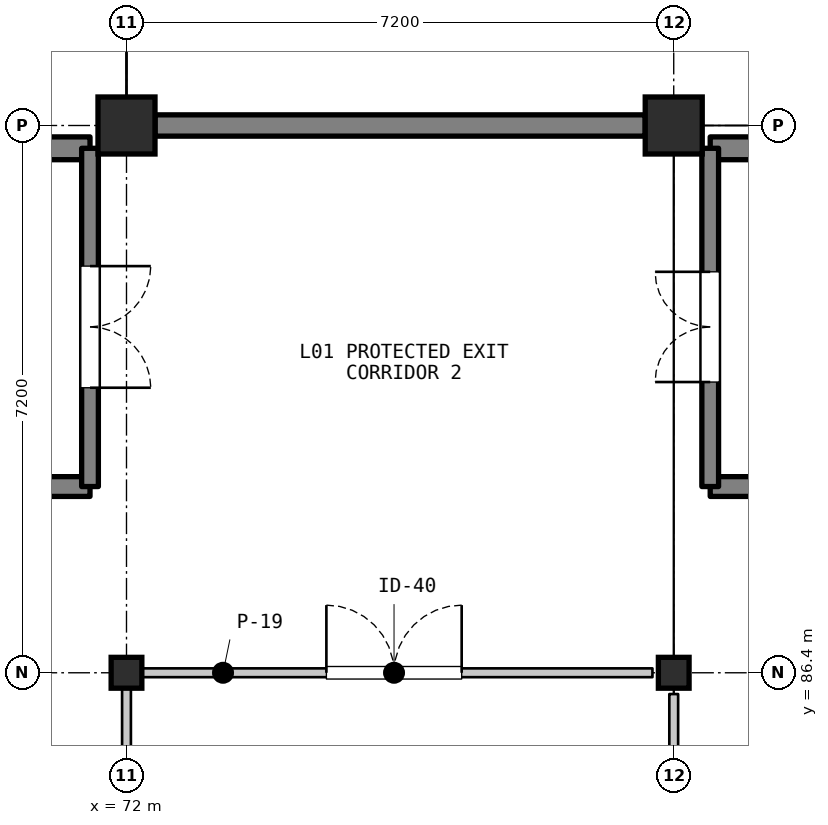
"""IFC4 building model, lengths in metres.
Left out: names, types, materials, properties, quantities, classifications, styles, units other than length and angle.
Written with IfcOpenShell. Run it as: python <this file> out.ifc"""

import sys

from ifc_helpers import new_model, si_unit, direction, frame, frame_2d, origin, origin_2d, place, context, subcontext, project, spatial, rectangle, i_section, extrude, element, fill, save


model = new_model("IFC4")
c1 = context("Model", 3, precision=1e-05, world=origin(), true_north=direction((0.0, 1.0)))
c2 = subcontext(c1, "Body", "Model", "MODEL_VIEW")
j1 = project(units=[si_unit("LENGTHUNIT", "METRE"), si_unit("PLANEANGLEUNIT", "RADIAN")], contexts=[c1])
p1 = place(None, origin())
s1 = spatial("IfcSite", under=j1, at=p1, CompositionType="ELEMENT")
p2 = place(p1, origin())
s2 = spatial("IfcBuilding", under=s1, at=p2, CompositionType="ELEMENT")
p3 = place(p2, origin())
s3 = spatial("IfcBuildingStorey", under=s2, at=p3, CompositionType="ELEMENT", Elevation=0.0)
p4 = place(p3, frame((72.0, 86.4, 0.0), z_axis=(0.0, 0.0, 1.0), x_axis=(1.0, 0.0, 0.0)))
e1 = element("IfcColumn", 1, at=p4, inside=s3, PredefinedType="COLUMN", context=c2, shape_type="SweptSolid", body=[
    extrude(i_section(OverallWidth=0.404, OverallDepth=0.406, WebThickness=0.027, FlangeThickness=0.044, FilletRadius=0.015, at=origin_2d()), origin(), (0.0, 0.0, 1.0), 5.4),
])
p5 = place(p3, frame((72.0, 93.6, 0.0), z_axis=(0.0, 0.0, 1.0), x_axis=(1.0, 0.0, 0.0)))
e2 = element("IfcColumn", 2, at=p5, inside=s3, PredefinedType="COLUMN", context=c2, shape_type="SweptSolid", body=[
    extrude(rectangle(XDim=0.75, YDim=0.75, at=origin_2d()), origin(), (0.0, 0.0, 1.0), 5.4),
])
p6 = place(p3, frame((79.2, 86.4, 0.0), z_axis=(0.0, 0.0, 1.0), x_axis=(1.0, 0.0, 0.0)))
e3 = element("IfcColumn", 3, at=p6, inside=s3, PredefinedType="COLUMN", context=c2, shape_type="SweptSolid", body=[
    extrude(i_section(OverallWidth=0.404, OverallDepth=0.406, WebThickness=0.027, FlangeThickness=0.044, FilletRadius=0.015, at=origin_2d()), origin(), (0.0, 0.0, 1.0), 5.4),
])
p7 = place(p3, frame((79.2, 93.6, 0.0), z_axis=(0.0, 0.0, 1.0), x_axis=(1.0, 0.0, 0.0)))
e4 = element("IfcColumn", 4, at=p7, inside=s3, PredefinedType="COLUMN", context=c2, shape_type="SweptSolid", body=[
    extrude(rectangle(XDim=0.75, YDim=0.75, at=origin_2d()), origin(), (0.0, 0.0, 1.0), 5.4),
])
p8 = place(p3, frame((72.375, 93.6, 0.0), z_axis=(0.0, 0.0, 1.0), x_axis=(1.0, 0.0, 0.0)))
e5 = element("IfcWall", 5, at=p8, inside=s3, PredefinedType="SOLIDWALL", context=c2, shape_type="SweptSolid", body=[
    extrude(rectangle(XDim=6.45, YDim=0.28, at=frame_2d((3.225, 0.0))), origin(), (0.0, 0.0, 1.0), 4.598),
])
p9 = place(p3, frame((66.11, 88.85, 0.0), z_axis=(0.0, 0.0, 1.0), x_axis=(1.0, 0.0, 0.0)))
e6 = element("IfcWall", 6, at=p9, inside=s3, PredefinedType="SHEAR", context=c2, shape_type="SweptSolid", body=[
    extrude(rectangle(XDim=5.41, YDim=0.26, at=frame_2d((2.705, 0.0))), origin(), (0.0, 0.0, 1.0), 5.2),
])
p10 = place(p9, frame((2.84, 0.0, 0.0)))
e7 = element("IfcOpeningElement", 7, at=p10, cuts=e6, PredefinedType="OPENING", context=c2, shape_type="SweptSolid", body=[
    extrude(rectangle(XDim=1.22, YDim=2.15, at=frame_2d((0.61, 1.075))), frame((0.0, 0.14, 0.0), z_axis=(0.0, -1.0, 0.0), x_axis=(1.0, 0.0, 0.0)), (0.0, 0.0, 1.0), 0.28),
])
p11 = place(p3, frame((65.6, 93.3, 0.0), z_axis=(0.0, 0.0, 1.0), x_axis=(1.0, 0.0, 0.0)))
e8 = element("IfcWall", 8, at=p11, inside=s3, PredefinedType="SHEAR", context=c2, shape_type="SweptSolid", body=[
    extrude(rectangle(XDim=5.92, YDim=0.3, at=frame_2d((2.96, 0.0))), origin(), (0.0, 0.0, 1.0), 5.2),
])
p12 = place(p11, frame((3.7, 0.0, 0.0)))
e9 = element("IfcOpeningElement", 9, at=p12, cuts=e8, PredefinedType="OPENING", context=c2, shape_type="SweptSolid", body=[
    extrude(rectangle(XDim=1.22, YDim=2.15, at=frame_2d((0.61, 1.075))), frame((0.0, 0.16, 0.0), z_axis=(0.0, -1.0, 0.0), x_axis=(1.0, 0.0, 0.0)), (0.0, 0.0, 1.0), 0.32),
])
p13 = place(p3, frame((71.52, 93.3, 0.0), z_axis=(0.0, 0.0, 1.0), x_axis=(0.0, -1.0, 0.0)))
e10 = element("IfcWall", 10, at=p13, inside=s3, PredefinedType="SHEAR", context=c2, shape_type="SweptSolid", body=[
    extrude(rectangle(XDim=4.45, YDim=0.22, at=frame_2d((2.225, 0.0))), origin(), (0.0, 0.0, 1.0), 5.2),
])
p14 = place(p13, frame((1.55, 0.0, 0.0)))
e11 = element("IfcOpeningElement", 11, at=p14, cuts=e10, PredefinedType="OPENING", context=c2, shape_type="SweptSolid", body=[
    extrude(rectangle(XDim=1.6, YDim=2.2, at=frame_2d((0.8, 1.1))), frame((0.0, 0.12, 0.0), z_axis=(0.0, -1.0, 0.0), x_axis=(1.0, 0.0, 0.0)), (0.0, 0.0, 1.0), 0.24),
])
p15 = place(p3, frame((79.68, 88.85, 0.0), z_axis=(0.0, 0.0, 1.0), x_axis=(1.0, 0.0, 0.0)))
e12 = element("IfcWall", 12, at=p15, inside=s3, PredefinedType="SHEAR", context=c2, shape_type="SweptSolid", body=[
    extrude(rectangle(XDim=5.41, YDim=0.26, at=frame_2d((2.705, 0.0))), origin(), (0.0, 0.0, 1.0), 5.2),
])
p16 = place(p15, frame((1.37, 0.0, 0.0)))
e13 = element("IfcOpeningElement", 13, at=p16, cuts=e12, PredefinedType="OPENING", context=c2, shape_type="SweptSolid", body=[
    extrude(rectangle(XDim=1.15, YDim=2.15, at=frame_2d((0.575, 1.075))), frame((0.0, 0.14, 0.0), z_axis=(0.0, -1.0, 0.0), x_axis=(1.0, 0.0, 0.0)), (0.0, 0.0, 1.0), 0.28),
])
p17 = place(p3, frame((79.68, 93.3, 0.0), z_axis=(0.0, 0.0, 1.0), x_axis=(1.0, 0.0, 0.0)))
e14 = element("IfcWall", 14, at=p17, inside=s3, PredefinedType="SHEAR", context=c2, shape_type="SweptSolid", body=[
    extrude(rectangle(XDim=5.92, YDim=0.3, at=frame_2d((2.96, 0.0))), origin(), (0.0, 0.0, 1.0), 5.2),
])
p18 = place(p17, frame((1.0, 0.0, 0.0)))
e15 = element("IfcOpeningElement", 15, at=p18, cuts=e14, PredefinedType="OPENING", context=c2, shape_type="SweptSolid", body=[
    extrude(rectangle(XDim=1.15, YDim=2.15, at=frame_2d((0.575, 1.075))), frame((0.0, 0.16, 0.0), z_axis=(0.0, -1.0, 0.0), x_axis=(1.0, 0.0, 0.0)), (0.0, 0.0, 1.0), 0.32),
])
p19 = place(p3, frame((79.68, 88.85, 0.0), z_axis=(0.0, 0.0, 1.0), x_axis=(0.0, 1.0, 0.0)))
e16 = element("IfcWall", 16, at=p19, inside=s3, PredefinedType="SHEAR", context=c2, shape_type="SweptSolid", body=[
    extrude(rectangle(XDim=4.45, YDim=0.22, at=frame_2d((2.225, 0.0))), origin(), (0.0, 0.0, 1.0), 5.2),
])
p20 = place(p19, frame((1.375, 0.0, 0.0)))
e17 = element("IfcOpeningElement", 17, at=p20, cuts=e16, PredefinedType="OPENING", context=c2, shape_type="SweptSolid", body=[
    extrude(rectangle(XDim=1.45, YDim=2.2, at=frame_2d((0.725, 1.1))), frame((0.0, 0.12, 0.0), z_axis=(0.0, -1.0, 0.0), x_axis=(1.0, 0.0, 0.0)), (0.0, 0.0, 1.0), 0.24),
])
p21 = place(p3, frame((72.12, 86.4, 0.0), z_axis=(0.0, 0.0, 1.0), x_axis=(1.0, 0.0, 0.0)))
e18 = element("IfcWall", 18, at=p21, inside=s3, PredefinedType="PARTITIONING", context=c2, shape_type="SweptSolid", body=[
    extrude(rectangle(XDim=6.8, YDim=0.116, at=frame_2d((3.4, 0.0))), origin(), (0.0, 0.0, 1.0), 4.588),
])
p22 = place(p21, frame((2.51, 0.0, 0.0)))
e19 = element("IfcOpeningElement", 19, at=p22, cuts=e18, PredefinedType="OPENING", context=c2, shape_type="SweptSolid", body=[
    extrude(rectangle(XDim=1.78, YDim=2.36, at=frame_2d((0.89, 1.18))), frame((0.0, 0.068, 0.0), z_axis=(0.0, -1.0, 0.0), x_axis=(1.0, 0.0, 0.0)), (0.0, 0.0, 1.0), 0.136),
])
p23 = place(p3, frame((72.0, 79.32, 0.0), z_axis=(0.0, 0.0, 1.0), x_axis=(0.0, 1.0, 0.0)))
e20 = element("IfcWall", 20, at=p23, inside=s3, PredefinedType="PARTITIONING", context=c2, shape_type="SweptSolid", body=[
    extrude(rectangle(XDim=6.96, YDim=0.116, at=frame_2d((3.48, 0.0))), origin(), (0.0, 0.0, 1.0), 4.588),
])
p24 = place(p3, frame((79.2, 86.12, 0.0), z_axis=(0.0, 0.0, 1.0), x_axis=(0.0, -1.0, 0.0)))
e21 = element("IfcWall", 21, at=p24, inside=s3, PredefinedType="PARTITIONING", context=c2, shape_type="SweptSolid", body=[
    extrude(rectangle(XDim=6.64, YDim=0.116, at=frame_2d((3.32, 0.0))), origin(), (0.0, 0.0, 1.0), 4.657),
])
p25 = place(p14, origin())
e22 = element("IfcDoor", 22, at=p25, inside=s3, OperationType="DOUBLE_DOOR_SINGLE_SWING", PredefinedType="DOOR", context=c2, shape_type="SweptSolid", body=[
    extrude(rectangle(XDim=1.6, YDim=2.2, at=frame_2d((0.8, 1.1))), frame((0.0, 0.025, 0.0), z_axis=(0.0, -1.0, 0.0), x_axis=(1.0, 0.0, 0.0)), (0.0, 0.0, 1.0), 0.05),
])
fill(e11, e22)
p26 = place(p20, origin())
e23 = element("IfcDoor", 23, at=p26, inside=s3, OperationType="DOUBLE_DOOR_SINGLE_SWING", PredefinedType="DOOR", context=c2, shape_type="SweptSolid", body=[
    extrude(rectangle(XDim=1.45, YDim=2.2, at=frame_2d((0.725, 1.1))), frame((0.0, 0.025, 0.0), z_axis=(0.0, -1.0, 0.0), x_axis=(1.0, 0.0, 0.0)), (0.0, 0.0, 1.0), 0.05),
])
fill(e17, e23)
p27 = place(p22, origin())
e24 = element("IfcDoor", 24, at=p27, inside=s3, OperationType="DOUBLE_DOOR_SINGLE_SWING", PredefinedType="DOOR", context=c2, shape_type="SweptSolid", body=[
    extrude(rectangle(XDim=1.78, YDim=2.36, at=frame_2d((0.89, 1.18))), frame((0.0, 0.025, 0.0), z_axis=(0.0, -1.0, 0.0), x_axis=(1.0, 0.0, 0.0)), (0.0, 0.0, 1.0), 0.05),
])
fill(e19, e24)
save(model, sys.argv[1])
